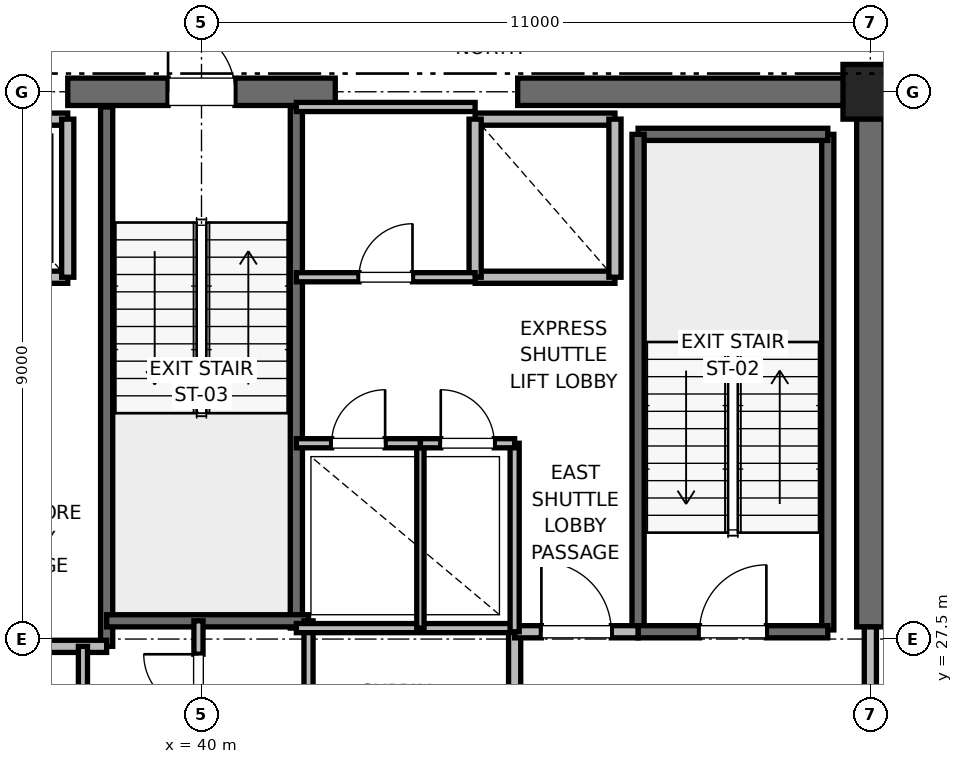
"""IFC4 building model, lengths in metres.
Left out: names, types, materials, properties, quantities, classifications, styles, units other than length and angle.
Written with IfcOpenShell. Run it as: python <this file> out.ifc"""

import sys

from ifc_helpers import new_model, si_unit, direction, frame, frame_2d, origin, origin_2d, place, context, subcontext, project, spatial, rectangle, extrude, element, fill, save


model = new_model("IFC4")
c1 = context("Model", 3, precision=1e-05, world=origin(), true_north=direction((0.0, 1.0)))
c2 = subcontext(c1, "Body", "Model", "MODEL_VIEW")
j1 = project(units=[si_unit("LENGTHUNIT", "METRE"), si_unit("PLANEANGLEUNIT", "RADIAN")], contexts=[c1])
p1 = place(None, origin())
s1 = spatial("IfcSite", under=j1, at=p1, CompositionType="ELEMENT")
p2 = place(p1, origin())
s2 = spatial("IfcBuilding", under=s1, at=p2, CompositionType="ELEMENT")
p3 = place(p2, frame((0.0, 0.0, 247.2)))
s3 = spatial("IfcBuildingStorey", under=s2, at=p3, CompositionType="ELEMENT", Elevation=247.2)
p4 = place(p3, frame((51.0, 36.5, 0.0), z_axis=(0.0, 0.0, 1.0), x_axis=(1.0, 0.0, 0.0)))
e1 = element("IfcColumn", 1, at=p4, inside=s3, PredefinedType="PILASTER", context=c2, shape_type="SweptSolid", body=[
    extrude(rectangle(XDim=0.9, YDim=0.9, at=origin_2d()), origin(), (0.0, 0.0, 1.0), 4.0),
])
p5 = place(p3, frame((37.8, 36.5, 0.0), z_axis=(0.0, 0.0, 1.0), x_axis=(1.0, 0.0, 0.0)))
e2 = element("IfcWall", 2, at=p5, inside=s3, PredefinedType="SHEAR", context=c2, shape_type="SweptSolid", body=[
    extrude(rectangle(XDim=4.4, YDim=0.45, at=frame_2d((2.2, 0.0))), origin(), (0.0, 0.0, 1.0), 3.785),
])
p6 = place(p5, frame((1.65, 0.0, 0.0)))
e3 = element("IfcOpeningElement", 3, at=p6, cuts=e2, PredefinedType="OPENING", context=c2, shape_type="SweptSolid", body=[
    extrude(rectangle(XDim=1.1, YDim=2.15, at=frame_2d((0.55, 1.075))), frame((0.0, 0.225, 0.0), z_axis=(0.0, -1.0, 0.0), x_axis=(1.0, 0.0, 0.0)), (0.0, 0.0, 1.0), 0.45),
])
p7 = place(p3, frame((45.2, 36.5, 0.0), z_axis=(0.0, 0.0, 1.0), x_axis=(1.0, 0.0, 0.0)))
e4 = element("IfcWall", 4, at=p7, inside=s3, PredefinedType="SHEAR", context=c2, shape_type="SweptSolid", body=[
    extrude(rectangle(XDim=5.8, YDim=0.45, at=frame_2d((2.9, 0.0))), origin(), (0.0, 0.0, 1.0), 3.785),
])
p8 = place(p3, frame((51.0, 27.7, 0.0), z_axis=(0.0, 0.0, 1.0), x_axis=(0.0, 1.0, 0.0)))
e5 = element("IfcWall", 5, at=p8, inside=s3, PredefinedType="SHEAR", context=c2, shape_type="SweptSolid", body=[
    extrude(rectangle(XDim=8.8, YDim=0.45, at=frame_2d((4.4, 0.0))), origin(), (0.0, 0.0, 1.0), 3.785),
])
p9 = place(p3, frame((50.3, 27.65, 0.0), z_axis=(0.0, 0.0, 1.0), x_axis=(0.0, 1.0, 0.0)))
e6 = element("IfcWall", 6, at=p9, inside=s3, PredefinedType="SOLIDWALL", context=c2, shape_type="SweptSolid", body=[
    extrude(rectangle(XDim=8.15, YDim=0.2, at=frame_2d((4.075, 0.0))), origin(), (0.0, 0.0, 1.0), 3.785),
])
p10 = place(p3, frame((47.18, 35.8, 0.0), z_axis=(0.0, 0.0, 1.0), x_axis=(1.0, 0.0, 0.0)))
e7 = element("IfcWall", 7, at=p10, inside=s3, PredefinedType="SOLIDWALL", context=c2, shape_type="SweptSolid", body=[
    extrude(rectangle(XDim=3.12, YDim=0.2, at=frame_2d((1.56, 0.0))), origin(), (0.0, 0.0, 1.0), 3.785),
])
p11 = place(p3, frame((47.18, 27.62, 0.0), z_axis=(0.0, 0.0, 1.0), x_axis=(0.0, 1.0, 0.0)))
e8 = element("IfcWall", 8, at=p11, inside=s3, PredefinedType="SOLIDWALL", context=c2, shape_type="SweptSolid", body=[
    extrude(rectangle(XDim=8.18, YDim=0.2, at=frame_2d((4.09, 0.0))), origin(), (0.0, 0.0, 1.0), 3.785),
])
p12 = place(p3, frame((47.18, 27.62, 0.0), z_axis=(0.0, 0.0, 1.0), x_axis=(1.0, 0.0, 0.0)))
e9 = element("IfcWall", 9, at=p12, inside=s3, PredefinedType="SOLIDWALL", context=c2, shape_type="SweptSolid", body=[
    extrude(rectangle(XDim=3.12, YDim=0.2, at=frame_2d((1.56, 0.0))), origin(), (0.0, 0.0, 1.0), 3.785),
])
p13 = place(p12, frame((1.01, 0.0, 0.0)))
e10 = element("IfcOpeningElement", 10, at=p13, cuts=e9, PredefinedType="OPENING", context=c2, shape_type="SweptSolid", body=[
    extrude(rectangle(XDim=1.1, YDim=2.15, at=frame_2d((0.55, 1.075))), frame((0.0, 0.1, 0.0), z_axis=(0.0, -1.0, 0.0), x_axis=(1.0, 0.0, 0.0)), (0.0, 0.0, 1.0), 0.2),
])
p14 = place(p3, frame((38.44, 27.38, 0.0), z_axis=(0.0, 0.0, 1.0), x_axis=(0.0, 1.0, 0.0)))
e11 = element("IfcWall", 11, at=p14, inside=s3, PredefinedType="SOLIDWALL", context=c2, shape_type="SweptSolid", body=[
    extrude(rectangle(XDim=8.87, YDim=0.2, at=frame_2d((4.435, 0.0))), origin(), (0.0, 0.0, 1.0), 3.785),
])
p15 = place(p3, frame((41.56, 27.68, 0.0), z_axis=(0.0, 0.0, 1.0), x_axis=(0.0, 1.0, 0.0)))
e12 = element("IfcWall", 12, at=p15, inside=s3, PredefinedType="SOLIDWALL", context=c2, shape_type="SweptSolid", body=[
    extrude(rectangle(XDim=8.57, YDim=0.2, at=frame_2d((4.285, 0.0))), origin(), (0.0, 0.0, 1.0), 3.785),
])
p16 = place(p3, frame((38.44, 27.8, 0.0), z_axis=(0.0, 0.0, 1.0), x_axis=(1.0, 0.0, 0.0)))
e13 = element("IfcWall", 13, at=p16, inside=s3, PredefinedType="SOLIDWALL", context=c2, shape_type="SweptSolid", body=[
    extrude(rectangle(XDim=3.32, YDim=0.2, at=frame_2d((1.66, 0.0))), origin(), (0.0, 0.0, 1.0), 3.785),
])
p17 = place(p3, frame((32.82, 27.38, 0.0), z_axis=(0.0, 0.0, 1.0), x_axis=(1.0, 0.0, 0.0)))
e14 = element("IfcWall", 14, at=p17, inside=s3, PredefinedType="PARTITIONING", context=c2, shape_type="SweptSolid", body=[
    extrude(rectangle(XDim=5.62, YDim=0.2, at=frame_2d((2.81, 0.0))), origin(), (0.0, 0.0, 1.0), 3.785),
])
p18 = place(p3, frame((45.15, 24.25, 0.0), z_axis=(0.0, 0.0, 1.0), x_axis=(0.0, 1.0, 0.0)))
e15 = element("IfcWall", 15, at=p18, inside=s3, PredefinedType="PARTITIONING", context=c2, shape_type="SweptSolid", body=[
    extrude(rectangle(XDim=3.37, YDim=0.2, at=frame_2d((1.685, 0.0))), origin(), (0.0, 0.0, 1.0), 3.785),
])
p19 = place(p3, frame((45.15, 27.62, 0.0), z_axis=(0.0, 0.0, 1.0), x_axis=(1.0, 0.0, 0.0)))
e16 = element("IfcWall", 16, at=p19, inside=s3, PredefinedType="PARTITIONING", context=c2, shape_type="SweptSolid", body=[
    extrude(rectangle(XDim=2.03, YDim=0.2, at=frame_2d((1.015, 0.0))), origin(), (0.0, 0.0, 1.0), 3.785),
])
p20 = place(p19, frame((0.44, 0.0, 0.0)))
e17 = element("IfcOpeningElement", 17, at=p20, cuts=e16, PredefinedType="OPENING", context=c2, shape_type="SweptSolid", body=[
    extrude(rectangle(XDim=1.15, YDim=2.2, at=frame_2d((0.575, 1.1))), frame((0.0, 0.1, 0.0), z_axis=(0.0, -1.0, 0.0), x_axis=(1.0, 0.0, 0.0)), (0.0, 0.0, 1.0), 0.2),
])
p21 = place(p3, frame((51.0, 24.3, 0.0), z_axis=(0.0, 0.0, 1.0), x_axis=(0.0, 1.0, 0.0)))
e18 = element("IfcWall", 18, at=p21, inside=s3, PredefinedType="PARTITIONING", context=c2, shape_type="SweptSolid", body=[
    extrude(rectangle(XDim=3.4, YDim=0.2, at=frame_2d((1.7, 0.0))), origin(), (0.0, 0.0, 1.0), 2.865),
])
p22 = place(p21, frame((1.125, 0.0, 0.0)))
e19 = element("IfcOpeningElement", 19, at=p22, cuts=e18, PredefinedType="OPENING", context=c2, shape_type="SweptSolid", body=[
    extrude(rectangle(XDim=1.15, YDim=2.2, at=frame_2d((0.575, 1.1))), frame((0.0, 0.1, 0.0), z_axis=(0.0, -1.0, 0.0), x_axis=(1.0, 0.0, 0.0)), (0.0, 0.0, 1.0), 0.2),
])
p23 = place(p3, frame((35.5, 33.45, 0.0), z_axis=(0.0, 0.0, 1.0), x_axis=(1.0, 0.0, 0.0)))
e20 = element("IfcWall", 20, at=p23, inside=s3, PredefinedType="SOLIDWALL", context=c2, shape_type="SweptSolid", body=[
    extrude(rectangle(XDim=2.3, YDim=0.2, at=frame_2d((1.15, 0.0))), origin(), (0.0, 0.0, 1.0), 3.785),
])
p24 = place(p23, frame((0.6, 0.0, 0.0)))
e21 = element("IfcOpeningElement", 21, at=p24, cuts=e20, PredefinedType="OPENING", context=c2, shape_type="SweptSolid", body=[
    extrude(rectangle(XDim=1.1, YDim=2.2, at=frame_2d((0.55, 1.1))), frame((0.0, 0.1, 0.0), z_axis=(0.0, -1.0, 0.0), x_axis=(1.0, 0.0, 0.0)), (0.0, 0.0, 1.0), 0.2),
])
p25 = place(p3, frame((37.8, 36.05, 0.0), z_axis=(0.0, 0.0, 1.0), x_axis=(-1.0, 0.0, 0.0)))
e22 = element("IfcWall", 22, at=p25, inside=s3, PredefinedType="SOLIDWALL", context=c2, shape_type="SweptSolid", body=[
    extrude(rectangle(XDim=2.3, YDim=0.2, at=frame_2d((1.15, 0.0))), origin(), (0.0, 0.0, 1.0), 2.865),
])
p26 = place(p3, frame((37.8, 33.45, 0.0), z_axis=(0.0, 0.0, 1.0), x_axis=(0.0, 1.0, 0.0)))
e23 = element("IfcWall", 23, at=p26, inside=s3, PredefinedType="SOLIDWALL", context=c2, shape_type="SweptSolid", body=[
    extrude(rectangle(XDim=2.6, YDim=0.2, at=frame_2d((1.3, 0.0))), origin(), (0.0, 0.0, 1.0), 2.865),
])
p27 = place(p3, frame((44.5, 33.45, 0.0), z_axis=(0.0, 0.0, 1.0), x_axis=(1.0, 0.0, 0.0)))
e24 = element("IfcWall", 24, at=p27, inside=s3, PredefinedType="SOLIDWALL", context=c2, shape_type="SweptSolid", body=[
    extrude(rectangle(XDim=2.3, YDim=0.2, at=frame_2d((1.15, 0.0))), origin(), (0.0, 0.0, 1.0), 3.785),
])
p28 = place(p3, frame((46.8, 36.05, 0.0), z_axis=(0.0, 0.0, 1.0), x_axis=(-1.0, 0.0, 0.0)))
e25 = element("IfcWall", 25, at=p28, inside=s3, PredefinedType="SOLIDWALL", context=c2, shape_type="SweptSolid", body=[
    extrude(rectangle(XDim=2.3, YDim=0.2, at=frame_2d((1.15, 0.0))), origin(), (0.0, 0.0, 1.0), 2.865),
])
p29 = place(p3, frame((44.5, 36.05, 0.0), z_axis=(0.0, 0.0, 1.0), x_axis=(0.0, -1.0, 0.0)))
e26 = element("IfcWall", 26, at=p29, inside=s3, PredefinedType="SOLIDWALL", context=c2, shape_type="SweptSolid", body=[
    extrude(rectangle(XDim=2.6, YDim=0.2, at=frame_2d((1.3, 0.0))), origin(), (0.0, 0.0, 1.0), 2.865),
])
p30 = place(p3, frame((46.8, 33.45, 0.0), z_axis=(0.0, 0.0, 1.0), x_axis=(0.0, 1.0, 0.0)))
e27 = element("IfcWall", 27, at=p30, inside=s3, PredefinedType="SOLIDWALL", context=c2, shape_type="SweptSolid", body=[
    extrude(rectangle(XDim=2.6, YDim=0.2, at=frame_2d((1.3, 0.0))), origin(), (0.0, 0.0, 1.0), 3.785),
])
p31 = place(p3, frame((41.76, 23.8, 0.0), z_axis=(0.0, 0.0, 1.0), x_axis=(0.0, 1.0, 0.0)))
e28 = element("IfcWall", 28, at=p31, inside=s3, PredefinedType="PARTITIONING", context=c2, shape_type="SweptSolid", body=[
    extrude(rectangle(XDim=4.0, YDim=0.15, at=frame_2d((2.0, 0.0))), origin(), (0.0, 0.0, 1.0), 2.85),
])
p32 = place(p3, frame((39.95, 25.8, 0.0), z_axis=(0.0, 0.0, 1.0), x_axis=(0.0, 1.0, 0.0)))
e29 = element("IfcWall", 29, at=p32, inside=s3, PredefinedType="PARTITIONING", context=c2, shape_type="SweptSolid", body=[
    extrude(rectangle(XDim=2.0, YDim=0.15, at=frame_2d((1.0, 0.0))), origin(), (0.0, 0.0, 1.0), 2.85),
])
p33 = place(p32, frame((0.55, 0.0, 0.0)))
e30 = element("IfcOpeningElement", 30, at=p33, cuts=e29, PredefinedType="OPENING", context=c2, shape_type="SweptSolid", body=[
    extrude(rectangle(XDim=0.9, YDim=2.1, at=frame_2d((0.45, 1.05))), frame((0.0, 0.075, 0.0), z_axis=(0.0, -1.0, 0.0), x_axis=(1.0, 0.0, 0.0)), (0.0, 0.0, 1.0), 0.15),
])
p34 = place(p3, frame((38.05, 24.5, 0.0), z_axis=(0.0, 0.0, 1.0), x_axis=(0.0, 1.0, 0.0)))
e31 = element("IfcWall", 31, at=p34, inside=s3, PredefinedType="PARTITIONING", context=c2, shape_type="SweptSolid", body=[
    extrude(rectangle(XDim=2.88, YDim=0.15, at=frame_2d((1.44, 0.0))), origin(), (0.0, 0.0, 1.0), 2.85),
])
p35 = place(p34, frame((0.94, 0.0, 0.0)))
e32 = element("IfcOpeningElement", 32, at=p35, cuts=e31, PredefinedType="OPENING", context=c2, shape_type="SweptSolid", body=[
    extrude(rectangle(XDim=1.0, YDim=2.15, at=frame_2d((0.5, 1.075))), frame((0.0, 0.075, 0.0), z_axis=(0.0, -1.0, 0.0), x_axis=(1.0, 0.0, 0.0)), (0.0, 0.0, 1.0), 0.15),
])
p36 = place(p3, frame((41.56, 27.68, 0.0), z_axis=(0.0, 0.0, 1.0), x_axis=(1.0, 0.0, 0.0)))
e33 = element("IfcWall", 33, at=p36, inside=s3, PredefinedType="PARTITIONING", context=c2, shape_type="SweptSolid", body=[
    extrude(rectangle(XDim=3.59, YDim=0.15, at=frame_2d((1.795, 0.0))), origin(), (0.0, 0.0, 1.0), 2.85),
])
p37 = place(p3, frame((45.15, 27.62, 0.0), z_axis=(0.0, 0.0, 1.0), x_axis=(0.0, 1.0, 0.0)))
e34 = element("IfcWall", 34, at=p37, inside=s3, PredefinedType="PARTITIONING", context=c2, shape_type="SweptSolid", body=[
    extrude(rectangle(XDim=3.1, YDim=0.15, at=frame_2d((1.55, 0.0))), origin(), (0.0, 0.0, 1.0), 2.85),
])
p38 = place(p3, frame((43.6, 27.68, 0.0), z_axis=(0.0, 0.0, 1.0), x_axis=(0.0, 1.0, 0.0)))
e35 = element("IfcWall", 35, at=p38, inside=s3, PredefinedType="PARTITIONING", context=c2, shape_type="SweptSolid", body=[
    extrude(rectangle(XDim=3.04, YDim=0.12, at=frame_2d((1.52, 0.0))), origin(), (0.0, 0.0, 1.0), 2.85),
])
p39 = place(p3, frame((41.56, 30.72, 0.0), z_axis=(0.0, 0.0, 1.0), x_axis=(1.0, 0.0, 0.0)))
e36 = element("IfcWall", 36, at=p39, inside=s3, PredefinedType="PARTITIONING", context=c2, shape_type="SweptSolid", body=[
    extrude(rectangle(XDim=2.04, YDim=0.15, at=frame_2d((1.02, 0.0))), origin(), (0.0, 0.0, 1.0), 2.85),
])
p40 = place(p39, frame((0.58, 0.0, 0.0)))
e37 = element("IfcOpeningElement", 37, at=p40, cuts=e36, PredefinedType="OPENING", context=c2, shape_type="SweptSolid", body=[
    extrude(rectangle(XDim=0.88, YDim=2.1, at=frame_2d((0.44, 1.05))), frame((0.0, 0.075, 0.0), z_axis=(0.0, -1.0, 0.0), x_axis=(1.0, 0.0, 0.0)), (0.0, 0.0, 1.0), 0.15),
])
p41 = place(p3, frame((43.6, 30.72, 0.0), z_axis=(0.0, 0.0, 1.0), x_axis=(1.0, 0.0, 0.0)))
e38 = element("IfcWall", 38, at=p41, inside=s3, PredefinedType="PARTITIONING", context=c2, shape_type="SweptSolid", body=[
    extrude(rectangle(XDim=1.55, YDim=0.15, at=frame_2d((0.775, 0.0))), origin(), (0.0, 0.0, 1.0), 2.85),
])
p42 = place(p41, frame((0.335, 0.0, 0.0)))
e39 = element("IfcOpeningElement", 39, at=p42, cuts=e38, PredefinedType="OPENING", context=c2, shape_type="SweptSolid", body=[
    extrude(rectangle(XDim=0.88, YDim=2.1, at=frame_2d((0.44, 1.05))), frame((0.0, 0.075, 0.0), z_axis=(0.0, -1.0, 0.0), x_axis=(1.0, 0.0, 0.0)), (0.0, 0.0, 1.0), 0.15),
])
p43 = place(p3, frame((41.56, 36.25, 0.0), z_axis=(0.0, 0.0, 1.0), x_axis=(1.0, 0.0, 0.0)))
e40 = element("IfcWall", 40, at=p43, inside=s3, PredefinedType="PARTITIONING", context=c2, shape_type="SweptSolid", body=[
    extrude(rectangle(XDim=2.94, YDim=0.15, at=frame_2d((1.47, 0.0))), origin(), (0.0, 0.0, 1.0), 2.85),
])
p44 = place(p3, frame((41.56, 33.45, 0.0), z_axis=(0.0, 0.0, 1.0), x_axis=(1.0, 0.0, 0.0)))
e41 = element("IfcWall", 41, at=p44, inside=s3, PredefinedType="PARTITIONING", context=c2, shape_type="SweptSolid", body=[
    extrude(rectangle(XDim=2.94, YDim=0.15, at=frame_2d((1.47, 0.0))), origin(), (0.0, 0.0, 1.0), 2.85),
])
p45 = place(p44, frame((1.03, 0.0, 0.0)))
e42 = element("IfcOpeningElement", 42, at=p45, cuts=e41, PredefinedType="OPENING", context=c2, shape_type="SweptSolid", body=[
    extrude(rectangle(XDim=0.88, YDim=2.1, at=frame_2d((0.44, 1.05))), frame((0.0, 0.075, 0.0), z_axis=(0.0, -1.0, 0.0), x_axis=(1.0, 0.0, 0.0)), (0.0, 0.0, 1.0), 0.15),
])
p46 = place(p13, origin())
e43 = element("IfcDoor", 43, at=p46, inside=s3, OperationType="SINGLE_SWING_RIGHT", PredefinedType="DOOR", context=c2, shape_type="SweptSolid", body=[
    extrude(rectangle(XDim=1.1, YDim=2.15, at=frame_2d((0.55, 1.075))), frame((0.0, 0.025, 0.0), z_axis=(0.0, -1.0, 0.0), x_axis=(1.0, 0.0, 0.0)), (0.0, 0.0, 1.0), 0.05),
])
fill(e10, e43)
p47 = place(p6, origin())
e44 = element("IfcDoor", 44, at=p47, inside=s3, OperationType="SINGLE_SWING_LEFT", PredefinedType="DOOR", context=c2, shape_type="SweptSolid", body=[
    extrude(rectangle(XDim=1.1, YDim=2.15, at=frame_2d((0.55, 1.075))), frame((0.0, 0.025, 0.0), z_axis=(0.0, -1.0, 0.0), x_axis=(1.0, 0.0, 0.0)), (0.0, 0.0, 1.0), 0.05),
])
fill(e3, e44)
p48 = place(p20, origin())
e45 = element("IfcDoor", 45, at=p48, inside=s3, OperationType="SINGLE_SWING_LEFT", PredefinedType="DOOR", context=c2, shape_type="SweptSolid", body=[
    extrude(rectangle(XDim=1.15, YDim=2.2, at=frame_2d((0.575, 1.1))), frame((0.0, 0.025, 0.0), z_axis=(0.0, -1.0, 0.0), x_axis=(1.0, 0.0, 0.0)), (0.0, 0.0, 1.0), 0.05),
])
fill(e17, e45)
p49 = place(p33, origin())
e46 = element("IfcDoor", 46, at=p49, inside=s3, OperationType="SINGLE_SWING_RIGHT", PredefinedType="DOOR", context=c2, shape_type="SweptSolid", body=[
    extrude(rectangle(XDim=0.9, YDim=2.1, at=frame_2d((0.45, 1.05))), frame((0.0, 0.025, 0.0), z_axis=(0.0, -1.0, 0.0), x_axis=(1.0, 0.0, 0.0)), (0.0, 0.0, 1.0), 0.05),
])
fill(e30, e46)
p50 = place(p40, origin())
e47 = element("IfcDoor", 47, at=p50, inside=s3, OperationType="SINGLE_SWING_RIGHT", PredefinedType="DOOR", context=c2, shape_type="SweptSolid", body=[
    extrude(rectangle(XDim=0.88, YDim=2.1, at=frame_2d((0.44, 1.05))), frame((0.0, 0.025, 0.0), z_axis=(0.0, -1.0, 0.0), x_axis=(1.0, 0.0, 0.0)), (0.0, 0.0, 1.0), 0.05),
])
fill(e37, e47)
p51 = place(p42, origin())
e48 = element("IfcDoor", 48, at=p51, inside=s3, OperationType="SINGLE_SWING_LEFT", PredefinedType="DOOR", context=c2, shape_type="SweptSolid", body=[
    extrude(rectangle(XDim=0.88, YDim=2.1, at=frame_2d((0.44, 1.05))), frame((0.0, 0.025, 0.0), z_axis=(0.0, -1.0, 0.0), x_axis=(1.0, 0.0, 0.0)), (0.0, 0.0, 1.0), 0.05),
])
fill(e39, e48)
p52 = place(p45, origin())
e49 = element("IfcDoor", 49, at=p52, inside=s3, OperationType="SINGLE_SWING_RIGHT", PredefinedType="DOOR", context=c2, shape_type="SweptSolid", body=[
    extrude(rectangle(XDim=0.88, YDim=2.1, at=frame_2d((0.44, 1.05))), frame((0.0, 0.025, 0.0), z_axis=(0.0, -1.0, 0.0), x_axis=(1.0, 0.0, 0.0)), (0.0, 0.0, 1.0), 0.05),
])
fill(e42, e49)
save(model, sys.argv[1])
